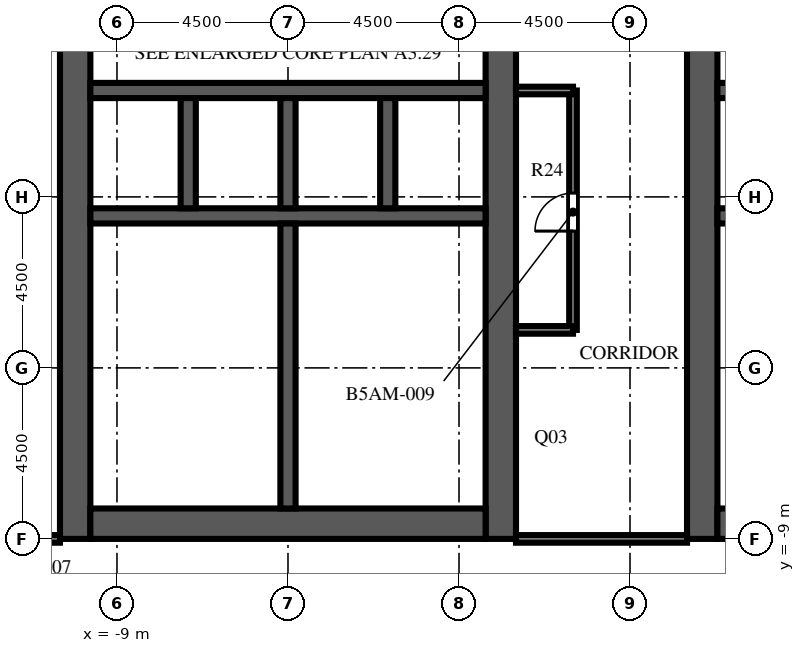
"""IFC4 building model, lengths in metres.
Left out: names, types, materials, properties, quantities, classifications, styles, units other than length and angle.
Written with IfcOpenShell. Run it as: python <this file> out.ifc"""

import sys

from ifc_helpers import new_model, si_unit, direction, frame, frame_2d, origin, place, context, subcontext, project, spatial, rectangle, extrude, element, fill, save


model = new_model("IFC4")
c1 = context("Model", 3, precision=1e-05, world=origin(), true_north=direction((0.0, 1.0)))
c2 = subcontext(c1, "Body", "Model", "MODEL_VIEW")
j1 = project(units=[si_unit("LENGTHUNIT", "METRE"), si_unit("PLANEANGLEUNIT", "RADIAN")], contexts=[c1])
p1 = place(None, origin())
s1 = spatial("IfcSite", under=j1, at=p1, CompositionType="ELEMENT")
p2 = place(p1, origin())
s2 = spatial("IfcBuilding", under=s1, at=p2, CompositionType="ELEMENT")
p3 = place(p2, frame((0.0, 0.0, 185.5)))
s3 = spatial("IfcBuildingStorey", under=s2, at=p3, CompositionType="ELEMENT", Elevation=185.5)
p4 = place(p3, frame((-10.1, -9.0, 0.0), z_axis=(0.0, 0.0, 1.0), x_axis=(0.0, 1.0, 0.0)))
e1 = element("IfcWall", 1, at=p4, inside=s3, PredefinedType="SHEAR", context=c2, shape_type="SweptSolid", body=[
    extrude(rectangle(XDim=27.5, YDim=0.8, at=frame_2d((13.75, 0.0))), origin(), (0.0, 0.0, 1.0), 6.0),
])
p5 = place(p4, frame((12.55, 0.0, 0.0)))
e2 = element("IfcOpeningElement", 2, at=p5, cuts=e1, PredefinedType="OPENING", context=c2, shape_type="SweptSolid", body=[
    extrude(rectangle(XDim=2.4, YDim=2.4, at=frame_2d((1.2, 1.2))), frame((0.0, 0.41, 0.0), z_axis=(0.0, -1.0, 0.0), x_axis=(1.0, 0.0, 0.0)), (0.0, 0.0, 1.0), 0.82),
])
p6 = place(p4, frame((6.825, 0.0, 0.0)))
e3 = element("IfcOpeningElement", 3, at=p6, cuts=e1, PredefinedType="OPENING", context=c2, shape_type="SweptSolid", body=[
    extrude(rectangle(XDim=1.2, YDim=2.1, at=frame_2d((0.6, 1.05))), frame((0.0, 0.41, 0.0), z_axis=(0.0, -1.0, 0.0), x_axis=(1.0, 0.0, 0.0)), (0.0, 0.0, 1.0), 0.82),
])
p7 = place(p4, frame((19.475, 0.0, 0.0)))
e4 = element("IfcOpeningElement", 4, at=p7, cuts=e1, PredefinedType="OPENING", context=c2, shape_type="SweptSolid", body=[
    extrude(rectangle(XDim=1.2, YDim=2.1, at=frame_2d((0.6, 1.05))), frame((0.0, 0.41, 0.0), z_axis=(0.0, -1.0, 0.0), x_axis=(1.0, 0.0, 0.0)), (0.0, 0.0, 1.0), 0.82),
])
p8 = place(p3, frame((1.1, -9.0, 0.0), z_axis=(0.0, 0.0, 1.0), x_axis=(0.0, 1.0, 0.0)))
e5 = element("IfcWall", 5, at=p8, inside=s3, PredefinedType="SHEAR", context=c2, shape_type="SweptSolid", body=[
    extrude(rectangle(XDim=27.5, YDim=0.8, at=frame_2d((13.75, 0.0))), origin(), (0.0, 0.0, 1.0), 6.0),
])
p9 = place(p8, frame((12.55, 0.0, 0.0)))
e6 = element("IfcOpeningElement", 6, at=p9, cuts=e5, PredefinedType="OPENING", context=c2, shape_type="SweptSolid", body=[
    extrude(rectangle(XDim=2.4, YDim=2.4, at=frame_2d((1.2, 1.2))), frame((0.0, 0.41, 0.0), z_axis=(0.0, -1.0, 0.0), x_axis=(1.0, 0.0, 0.0)), (0.0, 0.0, 1.0), 0.82),
])
p10 = place(p8, frame((3.85, 0.0, 0.0)))
e7 = element("IfcOpeningElement", 7, at=p10, cuts=e5, PredefinedType="OPENING", context=c2, shape_type="SweptSolid", body=[
    extrude(rectangle(XDim=0.95, YDim=2.1, at=frame_2d((0.475, 1.05))), frame((0.0, 0.41, 0.0), z_axis=(0.0, -1.0, 0.0), x_axis=(1.0, 0.0, 0.0)), (0.0, 0.0, 1.0), 0.82),
])
p11 = place(p8, frame((23.475, 0.0, 0.0)))
e8 = element("IfcOpeningElement", 8, at=p11, cuts=e5, PredefinedType="OPENING", context=c2, shape_type="SweptSolid", body=[
    extrude(rectangle(XDim=1.2, YDim=2.1, at=frame_2d((0.6, 1.05))), frame((0.0, 0.41, 0.0), z_axis=(0.0, -1.0, 0.0), x_axis=(1.0, 0.0, 0.0)), (0.0, 0.0, 1.0), 0.82),
])
p12 = place(p3, frame((-9.7, -8.6, 0.0), z_axis=(0.0, 0.0, 1.0), x_axis=(1.0, 0.0, 0.0)))
e9 = element("IfcWall", 9, at=p12, inside=s3, PredefinedType="SHEAR", context=c2, shape_type="SweptSolid", body=[
    extrude(rectangle(XDim=10.4, YDim=0.8, at=frame_2d((5.2, 0.0))), origin(), (0.0, 0.0, 1.0), 6.0),
])
p13 = place(p3, frame((-9.7, -0.5, 0.0), z_axis=(0.0, 0.0, 1.0), x_axis=(1.0, 0.0, 0.0)))
e10 = element("IfcWall", 10, at=p13, inside=s3, PredefinedType="SHEAR", context=c2, shape_type="SweptSolid", body=[
    extrude(rectangle(XDim=10.4, YDim=0.4, at=frame_2d((5.2, 0.0))), origin(), (0.0, 0.0, 1.0), 6.0),
])
p14 = place(p3, frame((-9.7, 2.8, 0.0), z_axis=(0.0, 0.0, 1.0), x_axis=(1.0, 0.0, 0.0)))
e11 = element("IfcWall", 11, at=p14, inside=s3, PredefinedType="SHEAR", context=c2, shape_type="SweptSolid", body=[
    extrude(rectangle(XDim=10.4, YDim=0.4, at=frame_2d((5.2, 0.0))), origin(), (0.0, 0.0, 1.0), 6.0),
])
p15 = place(p14, frame((0.738, 0.0, 0.0)))
e12 = element("IfcOpeningElement", 12, at=p15, cuts=e11, PredefinedType="OPENING", context=c2, shape_type="SweptSolid", body=[
    extrude(rectangle(XDim=1.1, YDim=2.1, at=frame_2d((0.55, 1.05))), frame((0.0, 0.21, 0.0), z_axis=(0.0, -1.0, 0.0), x_axis=(1.0, 0.0, 0.0)), (0.0, 0.0, 1.0), 0.42),
])
p16 = place(p14, frame((3.337, 0.0, 0.0)))
e13 = element("IfcOpeningElement", 13, at=p16, cuts=e11, PredefinedType="OPENING", context=c2, shape_type="SweptSolid", body=[
    extrude(rectangle(XDim=1.1, YDim=2.1, at=frame_2d((0.55, 1.05))), frame((0.0, 0.21, 0.0), z_axis=(0.0, -1.0, 0.0), x_axis=(1.0, 0.0, 0.0)), (0.0, 0.0, 1.0), 0.42),
])
p17 = place(p14, frame((6.012, 0.0, 0.0)))
e14 = element("IfcOpeningElement", 14, at=p17, cuts=e11, PredefinedType="OPENING", context=c2, shape_type="SweptSolid", body=[
    extrude(rectangle(XDim=1.0, YDim=2.1, at=frame_2d((0.5, 1.05))), frame((0.0, 0.21, 0.0), z_axis=(0.0, -1.0, 0.0), x_axis=(1.0, 0.0, 0.0)), (0.0, 0.0, 1.0), 0.42),
])
p18 = place(p14, frame((8.613, 0.0, 0.0)))
e15 = element("IfcOpeningElement", 15, at=p18, cuts=e11, PredefinedType="OPENING", context=c2, shape_type="SweptSolid", body=[
    extrude(rectangle(XDim=1.0, YDim=2.1, at=frame_2d((0.5, 1.05))), frame((0.0, 0.21, 0.0), z_axis=(0.0, -1.0, 0.0), x_axis=(1.0, 0.0, 0.0)), (0.0, 0.0, 1.0), 0.42),
])
for number, where, z_axis, x_axis in (
    (16, (-7.125, -0.3, 0.0), (0.0, 0.0, 1.0), (0.0, 1.0, 0.0)),
    (17, (-4.5, -0.3, 0.0), (0.0, 0.0, 1.0), (0.0, 1.0, 0.0)),
    (18, (-1.875, -0.3, 0.0), (0.0, 0.0, 1.0), (0.0, 1.0, 0.0)),
):
    element("IfcWall", number, at=place(p3, frame(where, z_axis=z_axis, x_axis=x_axis)), inside=s3, PredefinedType="SHEAR", context=c2, shape_type="SweptSolid", body=[
        extrude(rectangle(XDim=2.9, YDim=0.4, at=frame_2d((1.45, 0.0))), origin(), (0.0, 0.0, 1.0), 6.0),
    ])
p19 = place(p3, frame((-4.5, -8.2, 0.0), z_axis=(0.0, 0.0, 1.0), x_axis=(0.0, 1.0, 0.0)))
e19 = element("IfcWall", 19, at=p19, inside=s3, PredefinedType="SHEAR", context=c2, shape_type="SweptSolid", body=[
    extrude(rectangle(XDim=7.5, YDim=0.4, at=frame_2d((3.75, 0.0))), origin(), (0.0, 0.0, 1.0), 6.0),
])
p20 = place(p3, frame((6.4, -9.0, 0.0), z_axis=(0.0, 0.0, 1.0), x_axis=(0.0, 1.0, 0.0)))
e20 = element("IfcWall", 20, at=p20, inside=s3, PredefinedType="SHEAR", context=c2, shape_type="SweptSolid", body=[
    extrude(rectangle(XDim=27.5, YDim=0.8, at=frame_2d((13.75, 0.0))), origin(), (0.0, 0.0, 1.0), 6.0),
])
p21 = place(p20, frame((12.55, 0.0, 0.0)))
e21 = element("IfcOpeningElement", 21, at=p21, cuts=e20, PredefinedType="OPENING", context=c2, shape_type="SweptSolid", body=[
    extrude(rectangle(XDim=2.4, YDim=2.4, at=frame_2d((1.2, 1.2))), frame((0.0, 0.41, 0.0), z_axis=(0.0, -1.0, 0.0), x_axis=(1.0, 0.0, 0.0)), (0.0, 0.0, 1.0), 0.82),
])
p22 = place(p20, frame((3.85, 0.0, 0.0)))
e22 = element("IfcOpeningElement", 22, at=p22, cuts=e20, PredefinedType="OPENING", context=c2, shape_type="SweptSolid", body=[
    extrude(rectangle(XDim=0.95, YDim=2.1, at=frame_2d((0.475, 1.05))), frame((0.0, 0.41, 0.0), z_axis=(0.0, -1.0, 0.0), x_axis=(1.0, 0.0, 0.0)), (0.0, 0.0, 1.0), 0.82),
])
p23 = place(p20, frame((23.475, 0.0, 0.0)))
e23 = element("IfcOpeningElement", 23, at=p23, cuts=e20, PredefinedType="OPENING", context=c2, shape_type="SweptSolid", body=[
    extrude(rectangle(XDim=1.2, YDim=2.1, at=frame_2d((0.6, 1.05))), frame((0.0, 0.41, 0.0), z_axis=(0.0, -1.0, 0.0), x_axis=(1.0, 0.0, 0.0)), (0.0, 0.0, 1.0), 0.82),
])
p24 = place(p3, frame((6.8, -8.6, 0.0), z_axis=(0.0, 0.0, 1.0), x_axis=(1.0, 0.0, 0.0)))
e24 = element("IfcWall", 24, at=p24, inside=s3, PredefinedType="SHEAR", context=c2, shape_type="SweptSolid", body=[
    extrude(rectangle(XDim=10.4, YDim=0.8, at=frame_2d((5.2, 0.0))), origin(), (0.0, 0.0, 1.0), 6.0),
])
p25 = place(p3, frame((6.8, -0.5, 0.0), z_axis=(0.0, 0.0, 1.0), x_axis=(1.0, 0.0, 0.0)))
e25 = element("IfcWall", 25, at=p25, inside=s3, PredefinedType="SHEAR", context=c2, shape_type="SweptSolid", body=[
    extrude(rectangle(XDim=10.4, YDim=0.4, at=frame_2d((5.2, 0.0))), origin(), (0.0, 0.0, 1.0), 6.0),
])
p26 = place(p3, frame((6.8, 2.8, 0.0), z_axis=(0.0, 0.0, 1.0), x_axis=(1.0, 0.0, 0.0)))
e26 = element("IfcWall", 26, at=p26, inside=s3, PredefinedType="SHEAR", context=c2, shape_type="SweptSolid", body=[
    extrude(rectangle(XDim=10.4, YDim=0.4, at=frame_2d((5.2, 0.0))), origin(), (0.0, 0.0, 1.0), 6.0),
])
p27 = place(p26, frame((0.738, 0.0, 0.0)))
e27 = element("IfcOpeningElement", 27, at=p27, cuts=e26, PredefinedType="OPENING", context=c2, shape_type="SweptSolid", body=[
    extrude(rectangle(XDim=1.1, YDim=2.1, at=frame_2d((0.55, 1.05))), frame((0.0, 0.21, 0.0), z_axis=(0.0, -1.0, 0.0), x_axis=(1.0, 0.0, 0.0)), (0.0, 0.0, 1.0), 0.42),
])
p28 = place(p26, frame((3.337, 0.0, 0.0)))
e28 = element("IfcOpeningElement", 28, at=p28, cuts=e26, PredefinedType="OPENING", context=c2, shape_type="SweptSolid", body=[
    extrude(rectangle(XDim=1.1, YDim=2.1, at=frame_2d((0.55, 1.05))), frame((0.0, 0.21, 0.0), z_axis=(0.0, -1.0, 0.0), x_axis=(1.0, 0.0, 0.0)), (0.0, 0.0, 1.0), 0.42),
])
p29 = place(p26, frame((6.012, 0.0, 0.0)))
e29 = element("IfcOpeningElement", 29, at=p29, cuts=e26, PredefinedType="OPENING", context=c2, shape_type="SweptSolid", body=[
    extrude(rectangle(XDim=1.0, YDim=2.1, at=frame_2d((0.5, 1.05))), frame((0.0, 0.21, 0.0), z_axis=(0.0, -1.0, 0.0), x_axis=(1.0, 0.0, 0.0)), (0.0, 0.0, 1.0), 0.42),
])
p30 = place(p26, frame((8.613, 0.0, 0.0)))
e30 = element("IfcOpeningElement", 30, at=p30, cuts=e26, PredefinedType="OPENING", context=c2, shape_type="SweptSolid", body=[
    extrude(rectangle(XDim=1.0, YDim=2.1, at=frame_2d((0.5, 1.05))), frame((0.0, 0.21, 0.0), z_axis=(0.0, -1.0, 0.0), x_axis=(1.0, 0.0, 0.0)), (0.0, 0.0, 1.0), 0.42),
])
p31 = place(p3, frame((-4.3, -5.35, 0.0), z_axis=(0.0, 0.0, 1.0), x_axis=(1.0, 0.0, 0.0)))
e31 = element("IfcWall", 31, at=p31, inside=s3, PredefinedType="PARTITIONING", context=c2, shape_type="SweptSolid", body=[
    extrude(rectangle(XDim=5.0, YDim=0.1, at=frame_2d((2.5, 0.0))), origin(), (0.0, 0.0, 1.0), 5.55),
])
p32 = place(p31, frame((2.0, 0.0, 0.0)))
e32 = element("IfcOpeningElement", 32, at=p32, cuts=e31, PredefinedType="OPENING", context=c2, shape_type="SweptSolid", body=[
    extrude(rectangle(XDim=1.0, YDim=2.1, at=frame_2d((0.5, 1.05))), frame((0.0, 0.06, 0.0), z_axis=(0.0, -1.0, 0.0), x_axis=(1.0, 0.0, 0.0)), (0.0, 0.0, 1.0), 0.12),
])
p33 = place(p3, frame((-2.4, -4.0, 0.0), z_axis=(0.0, 0.0, 1.0), x_axis=(1.0, 0.0, 0.0)))
e33 = element("IfcWall", 33, at=p33, inside=s3, PredefinedType="PARTITIONING", context=c2, shape_type="SweptSolid", body=[
    extrude(rectangle(XDim=3.1, YDim=0.1, at=frame_2d((1.55, 0.0))), origin(), (0.0, 0.0, 1.0), 5.55),
])
p34 = place(p33, frame((1.05, 0.0, 0.0)))
e34 = element("IfcOpeningElement", 34, at=p34, cuts=e33, PredefinedType="OPENING", context=c2, shape_type="SweptSolid", body=[
    extrude(rectangle(XDim=1.0, YDim=2.1, at=frame_2d((0.5, 1.05))), frame((0.0, 0.06, 0.0), z_axis=(0.0, -1.0, 0.0), x_axis=(1.0, 0.0, 0.0)), (0.0, 0.0, 1.0), 0.12),
])
p35 = place(p3, frame((-4.3, -4.0, 0.0), z_axis=(0.0, 0.0, 1.0), x_axis=(1.0, 0.0, 0.0)))
e35 = element("IfcWall", 35, at=p35, inside=s3, PredefinedType="PARTITIONING", context=c2, shape_type="SweptSolid", body=[
    extrude(rectangle(XDim=1.9, YDim=0.1, at=frame_2d((0.95, 0.0))), origin(), (0.0, 0.0, 1.0), 5.55),
])
p36 = place(p35, frame((0.45, 0.0, 0.0)))
e36 = element("IfcOpeningElement", 36, at=p36, cuts=e35, PredefinedType="OPENING", context=c2, shape_type="SweptSolid", body=[
    extrude(rectangle(XDim=1.0, YDim=2.1, at=frame_2d((0.5, 1.05))), frame((0.0, 0.06, 0.0), z_axis=(0.0, -1.0, 0.0), x_axis=(1.0, 0.0, 0.0)), (0.0, 0.0, 1.0), 0.12),
])
p37 = place(p3, frame((-2.4, -4.0, 0.0), z_axis=(0.0, 0.0, 1.0), x_axis=(0.0, 1.0, 0.0)))
e37 = element("IfcWall", 37, at=p37, inside=s3, PredefinedType="PARTITIONING", context=c2, shape_type="SweptSolid", body=[
    extrude(rectangle(XDim=3.3, YDim=0.1, at=frame_2d((1.65, 0.0))), origin(), (0.0, 0.0, 1.0), 5.55),
])
p38 = place(p3, frame((6.8, -5.35, 0.0), z_axis=(0.0, 0.0, 1.0), x_axis=(1.0, 0.0, 0.0)))
e38 = element("IfcWall", 38, at=p38, inside=s3, PredefinedType="PARTITIONING", context=c2, shape_type="SweptSolid", body=[
    extrude(rectangle(XDim=5.0, YDim=0.1, at=frame_2d((2.5, 0.0))), origin(), (0.0, 0.0, 1.0), 5.55),
])
p39 = place(p38, frame((2.0, 0.0, 0.0)))
e39 = element("IfcOpeningElement", 39, at=p39, cuts=e38, PredefinedType="OPENING", context=c2, shape_type="SweptSolid", body=[
    extrude(rectangle(XDim=1.0, YDim=2.1, at=frame_2d((0.5, 1.05))), frame((0.0, 0.06, 0.0), z_axis=(0.0, -1.0, 0.0), x_axis=(1.0, 0.0, 0.0)), (0.0, 0.0, 1.0), 0.12),
])
p40 = place(p3, frame((6.8, -4.0, 0.0), z_axis=(0.0, 0.0, 1.0), x_axis=(1.0, 0.0, 0.0)))
e40 = element("IfcWall", 40, at=p40, inside=s3, PredefinedType="PARTITIONING", context=c2, shape_type="SweptSolid", body=[
    extrude(rectangle(XDim=3.1, YDim=0.1, at=frame_2d((1.55, 0.0))), origin(), (0.0, 0.0, 1.0), 5.55),
])
p41 = place(p40, frame((1.05, 0.0, 0.0)))
e41 = element("IfcOpeningElement", 41, at=p41, cuts=e40, PredefinedType="OPENING", context=c2, shape_type="SweptSolid", body=[
    extrude(rectangle(XDim=1.0, YDim=2.1, at=frame_2d((0.5, 1.05))), frame((0.0, 0.06, 0.0), z_axis=(0.0, -1.0, 0.0), x_axis=(1.0, 0.0, 0.0)), (0.0, 0.0, 1.0), 0.12),
])
p42 = place(p3, frame((3.0, -3.5, 0.0), z_axis=(0.0, 0.0, 1.0), x_axis=(0.0, 1.0, 0.0)))
e42 = element("IfcWall", 42, at=p42, inside=s3, PredefinedType="PARTITIONING", context=c2, shape_type="SweptSolid", body=[
    extrude(rectangle(XDim=6.3, YDim=0.2, at=frame_2d((3.15, 0.0))), origin(), (0.0, 0.0, 1.0), 5.55),
])
p43 = place(p42, frame((2.6, 0.0, 0.0)))
e43 = element("IfcOpeningElement", 43, at=p43, cuts=e42, PredefinedType="OPENING", context=c2, shape_type="SweptSolid", body=[
    extrude(rectangle(XDim=1.0, YDim=2.1, at=frame_2d((0.5, 1.05))), frame((0.0, 0.11, 0.0), z_axis=(0.0, -1.0, 0.0), x_axis=(1.0, 0.0, 0.0)), (0.0, 0.0, 1.0), 0.22),
])
p44 = place(p3, frame((-10.5, -9.0, 0.0), z_axis=(0.0, 0.0, 1.0), x_axis=(-1.0, 0.0, 0.0)))
e44 = element("IfcWall", 44, at=p44, inside=s3, PredefinedType="PARTITIONING", context=c2, shape_type="SweptSolid", body=[
    extrude(rectangle(XDim=3.0, YDim=0.2, at=frame_2d((1.5, 0.0))), origin(), (0.0, 0.0, 1.0), 5.55),
])
p45 = place(p44, frame((1.15, 0.0, 0.0)))
e45 = element("IfcOpeningElement", 45, at=p45, cuts=e44, PredefinedType="OPENING", context=c2, shape_type="SweptSolid", body=[
    extrude(rectangle(XDim=1.0, YDim=2.1, at=frame_2d((0.5, 1.05))), frame((0.0, 0.11, 0.0), z_axis=(0.0, -1.0, 0.0), x_axis=(1.0, 0.0, 0.0)), (0.0, 0.0, 1.0), 0.22),
])
p46 = place(p3, frame((1.5, -9.0, 0.0), z_axis=(0.0, 0.0, 1.0), x_axis=(1.0, 0.0, 0.0)))
e46 = element("IfcWall", 46, at=p46, inside=s3, PredefinedType="PARTITIONING", context=c2, shape_type="SweptSolid", body=[
    extrude(rectangle(XDim=4.5, YDim=0.2, at=frame_2d((2.25, 0.0))), origin(), (0.0, 0.0, 1.0), 5.55),
])
for number, where, z_axis, x_axis in (
    (47, (1.5, -3.5, 0.0), (0.0, 0.0, 1.0), (1.0, 0.0, 0.0)),
    (48, (1.5, 2.8, 0.0), (0.0, 0.0, 1.0), (1.0, 0.0, 0.0)),
):
    element("IfcWall", number, at=place(p3, frame(where, z_axis=z_axis, x_axis=x_axis)), inside=s3, PredefinedType="PARTITIONING", context=c2, shape_type="SweptSolid", body=[
        extrude(rectangle(XDim=1.5, YDim=0.2, at=frame_2d((0.75, 0.0))), origin(), (0.0, 0.0, 1.0), 5.55),
    ])
p47 = place(p15, origin())
e49 = element("IfcDoor", 49, at=p47, inside=s3, OperationType="DOUBLE_DOOR_SLIDING", PredefinedType="DOOR", context=c2, shape_type="SweptSolid", body=[
    extrude(rectangle(XDim=1.1, YDim=2.1, at=frame_2d((0.55, 1.05))), frame((0.0, 0.025, 0.0), z_axis=(0.0, -1.0, 0.0), x_axis=(1.0, 0.0, 0.0)), (0.0, 0.0, 1.0), 0.05),
])
fill(e12, e49)
p48 = place(p16, origin())
e50 = element("IfcDoor", 50, at=p48, inside=s3, OperationType="DOUBLE_DOOR_SLIDING", PredefinedType="DOOR", context=c2, shape_type="SweptSolid", body=[
    extrude(rectangle(XDim=1.1, YDim=2.1, at=frame_2d((0.55, 1.05))), frame((0.0, 0.025, 0.0), z_axis=(0.0, -1.0, 0.0), x_axis=(1.0, 0.0, 0.0)), (0.0, 0.0, 1.0), 0.05),
])
fill(e13, e50)
p49 = place(p5, origin())
e51 = element("IfcDoor", 51, at=p49, inside=s3, OperationType="DOUBLE_DOOR_DOUBLE_SWING", PredefinedType="DOOR", context=c2, shape_type="SweptSolid", body=[
    extrude(rectangle(XDim=2.4, YDim=2.4, at=frame_2d((1.2, 1.2))), frame((0.0, 0.025, 0.0), z_axis=(0.0, -1.0, 0.0), x_axis=(1.0, 0.0, 0.0)), (0.0, 0.0, 1.0), 0.05),
])
fill(e2, e51)
p50 = place(p9, origin())
e52 = element("IfcDoor", 52, at=p50, inside=s3, OperationType="DOUBLE_DOOR_DOUBLE_SWING", PredefinedType="DOOR", context=c2, shape_type="SweptSolid", body=[
    extrude(rectangle(XDim=2.4, YDim=2.4, at=frame_2d((1.2, 1.2))), frame((0.0, 0.025, 0.0), z_axis=(0.0, -1.0, 0.0), x_axis=(1.0, 0.0, 0.0)), (0.0, 0.0, 1.0), 0.05),
])
fill(e6, e52)
p51 = place(p21, origin())
e53 = element("IfcDoor", 53, at=p51, inside=s3, OperationType="DOUBLE_DOOR_DOUBLE_SWING", PredefinedType="DOOR", context=c2, shape_type="SweptSolid", body=[
    extrude(rectangle(XDim=2.4, YDim=2.4, at=frame_2d((1.2, 1.2))), frame((0.0, 0.025, 0.0), z_axis=(0.0, -1.0, 0.0), x_axis=(1.0, 0.0, 0.0)), (0.0, 0.0, 1.0), 0.05),
])
fill(e21, e53)
p52 = place(p6, origin())
e54 = element("IfcDoor", 54, at=p52, inside=s3, OperationType="SINGLE_SWING_LEFT", PredefinedType="DOOR", context=c2, shape_type="SweptSolid", body=[
    extrude(rectangle(XDim=1.2, YDim=2.1, at=frame_2d((0.6, 1.05))), frame((0.0, 0.025, 0.0), z_axis=(0.0, -1.0, 0.0), x_axis=(1.0, 0.0, 0.0)), (0.0, 0.0, 1.0), 0.05),
])
fill(e3, e54)
p53 = place(p17, origin())
e55 = element("IfcDoor", 55, at=p53, inside=s3, OperationType="SINGLE_SWING_LEFT", PredefinedType="DOOR", context=c2, shape_type="SweptSolid", body=[
    extrude(rectangle(XDim=1.0, YDim=2.1, at=frame_2d((0.5, 1.05))), frame((0.0, 0.025, 0.0), z_axis=(0.0, -1.0, 0.0), x_axis=(1.0, 0.0, 0.0)), (0.0, 0.0, 1.0), 0.05),
])
fill(e14, e55)
p54 = place(p18, origin())
e56 = element("IfcDoor", 56, at=p54, inside=s3, OperationType="SINGLE_SWING_RIGHT", PredefinedType="DOOR", context=c2, shape_type="SweptSolid", body=[
    extrude(rectangle(XDim=1.0, YDim=2.1, at=frame_2d((0.5, 1.05))), frame((0.0, 0.025, 0.0), z_axis=(0.0, -1.0, 0.0), x_axis=(1.0, 0.0, 0.0)), (0.0, 0.0, 1.0), 0.05),
])
fill(e15, e56)
p55 = place(p10, origin())
e57 = element("IfcDoor", 57, at=p55, inside=s3, OperationType="SINGLE_SWING_LEFT", PredefinedType="DOOR", context=c2, shape_type="SweptSolid", body=[
    extrude(rectangle(XDim=0.95, YDim=2.1, at=frame_2d((0.475, 1.05))), frame((0.0, 0.375, 0.0), z_axis=(0.0, -1.0, 0.0), x_axis=(1.0, 0.0, 0.0)), (0.0, 0.0, 1.0), 0.05),
])
fill(e7, e57)
p56 = place(p32, origin())
e58 = element("IfcDoor", 58, at=p56, inside=s3, OperationType="SINGLE_SWING_RIGHT", PredefinedType="DOOR", context=c2, shape_type="SweptSolid", body=[
    extrude(rectangle(XDim=1.0, YDim=2.1, at=frame_2d((0.5, 1.05))), frame((0.0, 0.025, 0.0), z_axis=(0.0, -1.0, 0.0), x_axis=(1.0, 0.0, 0.0)), (0.0, 0.0, 1.0), 0.05),
])
fill(e32, e58)
p57 = place(p34, origin())
e59 = element("IfcDoor", 59, at=p57, inside=s3, OperationType="SINGLE_SWING_LEFT", PredefinedType="DOOR", context=c2, shape_type="SweptSolid", body=[
    extrude(rectangle(XDim=1.0, YDim=2.1, at=frame_2d((0.5, 1.05))), frame((0.0, 0.025, 0.0), z_axis=(0.0, -1.0, 0.0), x_axis=(1.0, 0.0, 0.0)), (0.0, 0.0, 1.0), 0.05),
])
fill(e34, e59)
p58 = place(p36, origin())
e60 = element("IfcDoor", 60, at=p58, inside=s3, OperationType="SINGLE_SWING_RIGHT", PredefinedType="DOOR", context=c2, shape_type="SweptSolid", body=[
    extrude(rectangle(XDim=1.0, YDim=2.1, at=frame_2d((0.5, 1.05))), frame((0.0, 0.025, 0.0), z_axis=(0.0, -1.0, 0.0), x_axis=(1.0, 0.0, 0.0)), (0.0, 0.0, 1.0), 0.05),
])
fill(e36, e60)
p59 = place(p22, origin())
e61 = element("IfcDoor", 61, at=p59, inside=s3, OperationType="SINGLE_SWING_RIGHT", PredefinedType="DOOR", context=c2, shape_type="SweptSolid", body=[
    extrude(rectangle(XDim=0.95, YDim=2.1, at=frame_2d((0.475, 1.05))), frame((0.0, -0.325, 0.0), z_axis=(0.0, -1.0, 0.0), x_axis=(1.0, 0.0, 0.0)), (0.0, 0.0, 1.0), 0.05),
])
fill(e22, e61)
p60 = place(p43, origin())
e62 = element("IfcDoor", 62, at=p60, inside=s3, OperationType="SINGLE_SWING_LEFT", PredefinedType="DOOR", context=c2, shape_type="SweptSolid", body=[
    extrude(rectangle(XDim=1.0, YDim=2.1, at=frame_2d((0.5, 1.05))), frame((0.0, 0.025, 0.0), z_axis=(0.0, -1.0, 0.0), x_axis=(1.0, 0.0, 0.0)), (0.0, 0.0, 1.0), 0.05),
])
fill(e43, e62)
save(model, sys.argv[1])
